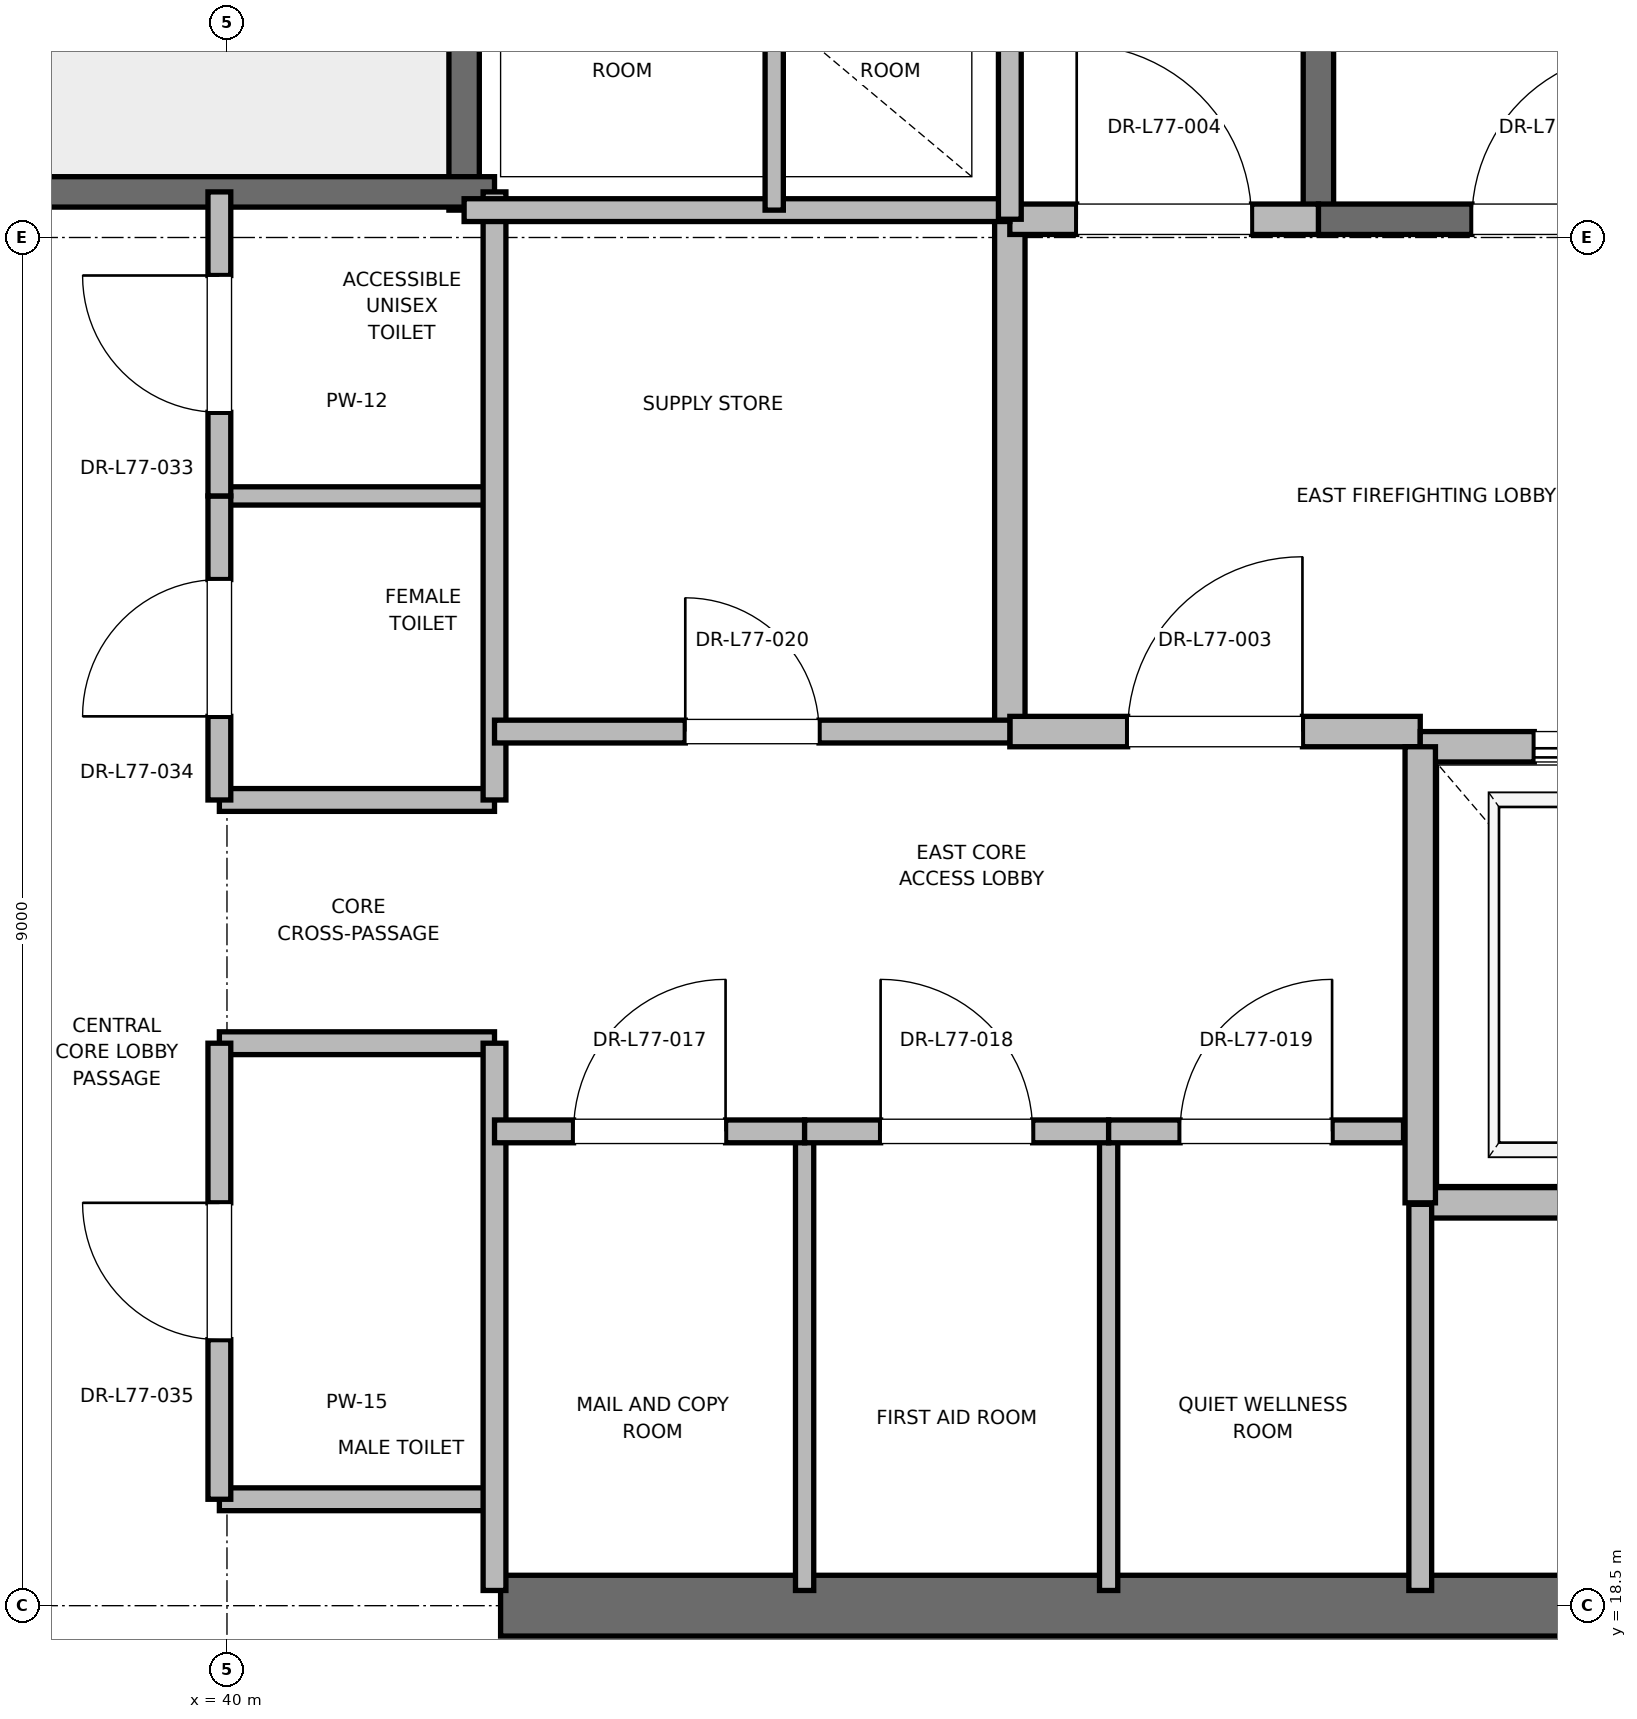
"""IFC4 building model, lengths in metres.
Left out: names, types, materials, properties, quantities, classifications, styles, units other than length and angle.
Written with IfcOpenShell. Run it as: python <this file> out.ifc"""

import sys

from ifc_helpers import new_model, si_unit, direction, frame, frame_2d, origin, place, context, subcontext, project, spatial, rectangle, extrude, element, fill, save


model = new_model("IFC4")
c1 = context("Model", 3, precision=1e-05, world=origin(), true_north=direction((0.0, 1.0)))
c2 = subcontext(c1, "Body", "Model", "MODEL_VIEW")
j1 = project(units=[si_unit("LENGTHUNIT", "METRE"), si_unit("PLANEANGLEUNIT", "RADIAN")], contexts=[c1])
p1 = place(None, origin())
s1 = spatial("IfcSite", under=j1, at=p1, CompositionType="ELEMENT")
p2 = place(p1, origin())
s2 = spatial("IfcBuilding", under=s1, at=p2, CompositionType="ELEMENT")
p3 = place(p2, frame((0.0, 0.0, 330.8)))
s3 = spatial("IfcBuildingStorey", under=s2, at=p3, CompositionType="ELEMENT", Elevation=330.8)
p4 = place(p3, frame((41.8, 18.5, 0.0), z_axis=(0.0, 0.0, 1.0), x_axis=(1.0, 0.0, 0.0)))
e1 = element("IfcWall", 1, at=p4, inside=s3, PredefinedType="SHEAR", context=c2, shape_type="SweptSolid", body=[
    extrude(rectangle(XDim=9.2, YDim=0.4, at=frame_2d((4.6, 0.0))), origin(), (0.0, 0.0, 1.0), 3.785),
])
p5 = place(p3, frame((47.18, 27.62, 0.0), z_axis=(0.0, 0.0, 1.0), x_axis=(0.0, 1.0, 0.0)))
e2 = element("IfcWall", 2, at=p5, inside=s3, PredefinedType="SOLIDWALL", context=c2, shape_type="SweptSolid", body=[
    extrude(rectangle(XDim=8.18, YDim=0.2, at=frame_2d((4.09, 0.0))), origin(), (0.0, 0.0, 1.0), 3.785),
])
p6 = place(p3, frame((47.18, 27.62, 0.0), z_axis=(0.0, 0.0, 1.0), x_axis=(1.0, 0.0, 0.0)))
e3 = element("IfcWall", 3, at=p6, inside=s3, PredefinedType="SOLIDWALL", context=c2, shape_type="SweptSolid", body=[
    extrude(rectangle(XDim=3.12, YDim=0.2, at=frame_2d((1.56, 0.0))), origin(), (0.0, 0.0, 1.0), 3.785),
])
p7 = place(p6, frame((1.01, 0.0, 0.0)))
e4 = element("IfcOpeningElement", 4, at=p7, cuts=e3, PredefinedType="OPENING", context=c2, shape_type="SweptSolid", body=[
    extrude(rectangle(XDim=1.1, YDim=2.15, at=frame_2d((0.55, 1.075))), frame((0.0, 0.1, 0.0), z_axis=(0.0, -1.0, 0.0), x_axis=(1.0, 0.0, 0.0)), (0.0, 0.0, 1.0), 0.2),
])
p8 = place(p3, frame((41.56, 27.68, 0.0), z_axis=(0.0, 0.0, 1.0), x_axis=(0.0, 1.0, 0.0)))
e5 = element("IfcWall", 5, at=p8, inside=s3, PredefinedType="SOLIDWALL", context=c2, shape_type="SweptSolid", body=[
    extrude(rectangle(XDim=8.57, YDim=0.2, at=frame_2d((4.285, 0.0))), origin(), (0.0, 0.0, 1.0), 3.785),
])
p9 = place(p3, frame((38.44, 27.8, 0.0), z_axis=(0.0, 0.0, 1.0), x_axis=(1.0, 0.0, 0.0)))
e6 = element("IfcWall", 6, at=p9, inside=s3, PredefinedType="SOLIDWALL", context=c2, shape_type="SweptSolid", body=[
    extrude(rectangle(XDim=3.32, YDim=0.2, at=frame_2d((1.66, 0.0))), origin(), (0.0, 0.0, 1.0), 3.785),
])
p10 = place(p3, frame((45.15, 24.25, 0.0), z_axis=(0.0, 0.0, 1.0), x_axis=(0.0, 1.0, 0.0)))
e7 = element("IfcWall", 7, at=p10, inside=s3, PredefinedType="PARTITIONING", context=c2, shape_type="SweptSolid", body=[
    extrude(rectangle(XDim=3.37, YDim=0.2, at=frame_2d((1.685, 0.0))), origin(), (0.0, 0.0, 1.0), 3.785),
])
p11 = place(p3, frame((45.15, 24.25, 0.0), z_axis=(0.0, 0.0, 1.0), x_axis=(1.0, 0.0, 0.0)))
e8 = element("IfcWall", 8, at=p11, inside=s3, PredefinedType="PARTITIONING", context=c2, shape_type="SweptSolid", body=[
    extrude(rectangle(XDim=2.7, YDim=0.2, at=frame_2d((1.35, 0.0))), origin(), (0.0, 0.0, 1.0), 3.785),
])
p12 = place(p11, frame((0.775, 0.0, 0.0)))
e9 = element("IfcOpeningElement", 9, at=p12, cuts=e8, PredefinedType="OPENING", context=c2, shape_type="SweptSolid", body=[
    extrude(rectangle(XDim=1.15, YDim=2.2, at=frame_2d((0.575, 1.1))), frame((0.0, 0.1, 0.0), z_axis=(0.0, -1.0, 0.0), x_axis=(1.0, 0.0, 0.0)), (0.0, 0.0, 1.0), 0.2),
])
p13 = place(p3, frame((45.15, 27.62, 0.0), z_axis=(0.0, 0.0, 1.0), x_axis=(1.0, 0.0, 0.0)))
e10 = element("IfcWall", 10, at=p13, inside=s3, PredefinedType="PARTITIONING", context=c2, shape_type="SweptSolid", body=[
    extrude(rectangle(XDim=2.03, YDim=0.2, at=frame_2d((1.015, 0.0))), origin(), (0.0, 0.0, 1.0), 3.785),
])
p14 = place(p13, frame((0.44, 0.0, 0.0)))
e11 = element("IfcOpeningElement", 11, at=p14, cuts=e10, PredefinedType="OPENING", context=c2, shape_type="SweptSolid", body=[
    extrude(rectangle(XDim=1.15, YDim=2.2, at=frame_2d((0.575, 1.1))), frame((0.0, 0.1, 0.0), z_axis=(0.0, -1.0, 0.0), x_axis=(1.0, 0.0, 0.0)), (0.0, 0.0, 1.0), 0.2),
])
p15 = place(p3, frame((47.85, 21.15, 0.0), z_axis=(0.0, 0.0, 1.0), x_axis=(1.0, 0.0, 0.0)))
e12 = element("IfcWall", 12, at=p15, inside=s3, PredefinedType="SOLIDWALL", context=c2, shape_type="SweptSolid", body=[
    extrude(rectangle(XDim=2.6, YDim=0.2, at=frame_2d((1.3, 0.0))), origin(), (0.0, 0.0, 1.0), 3.785),
])
p16 = place(p3, frame((50.45, 24.15, 0.0), z_axis=(0.0, 0.0, 1.0), x_axis=(-1.0, 0.0, 0.0)))
e13 = element("IfcWall", 13, at=p16, inside=s3, PredefinedType="SOLIDWALL", context=c2, shape_type="SweptSolid", body=[
    extrude(rectangle(XDim=2.6, YDim=0.2, at=frame_2d((1.3, 0.0))), origin(), (0.0, 0.0, 1.0), 2.865),
])
p17 = place(p16, frame((0.75, 0.0, 0.0)))
e14 = element("IfcOpeningElement", 14, at=p17, cuts=e13, PredefinedType="OPENING", context=c2, shape_type="SweptSolid", body=[
    extrude(rectangle(XDim=1.1, YDim=2.2, at=frame_2d((0.55, 1.1))), frame((0.0, 0.1, 0.0), z_axis=(0.0, -1.0, 0.0), x_axis=(1.0, 0.0, 0.0)), (0.0, 0.0, 1.0), 0.2),
])
p18 = place(p3, frame((47.85, 24.15, 0.0), z_axis=(0.0, 0.0, 1.0), x_axis=(0.0, -1.0, 0.0)))
e15 = element("IfcWall", 15, at=p18, inside=s3, PredefinedType="SOLIDWALL", context=c2, shape_type="SweptSolid", body=[
    extrude(rectangle(XDim=3.0, YDim=0.2, at=frame_2d((1.5, 0.0))), origin(), (0.0, 0.0, 1.0), 3.785),
])
for number, where, z_axis, x_axis in (
    (16, (39.95, 19.2, 0.0), (0.0, 0.0, 1.0), (1.0, 0.0, 0.0)),
    (17, (39.95, 22.2, 0.0), (0.0, 0.0, 1.0), (1.0, 0.0, 0.0)),
    (18, (39.95, 23.8, 0.0), (0.0, 0.0, 1.0), (1.0, 0.0, 0.0)),
):
    element("IfcWall", number, at=place(p3, frame(where, z_axis=z_axis, x_axis=x_axis)), inside=s3, PredefinedType="PARTITIONING", context=c2, shape_type="SweptSolid", body=[
        extrude(rectangle(XDim=1.81, YDim=0.15, at=frame_2d((0.905, 0.0))), origin(), (0.0, 0.0, 1.0), 2.85),
    ])
p19 = place(p3, frame((39.95, 25.8, 0.0), z_axis=(0.0, 0.0, 1.0), x_axis=(1.0, 0.0, 0.0)))
e19 = element("IfcWall", 19, at=p19, inside=s3, PredefinedType="PARTITIONING", context=c2, shape_type="SweptSolid", body=[
    extrude(rectangle(XDim=1.81, YDim=0.12, at=frame_2d((0.905, 0.0))), origin(), (0.0, 0.0, 1.0), 2.85),
])
p20 = place(p3, frame((41.76, 18.6, 0.0), z_axis=(0.0, 0.0, 1.0), x_axis=(0.0, 1.0, 0.0)))
e20 = element("IfcWall", 20, at=p20, inside=s3, PredefinedType="PARTITIONING", context=c2, shape_type="SweptSolid", body=[
    extrude(rectangle(XDim=3.6, YDim=0.15, at=frame_2d((1.8, 0.0))), origin(), (0.0, 0.0, 1.0), 2.85),
])
p21 = place(p3, frame((41.76, 23.8, 0.0), z_axis=(0.0, 0.0, 1.0), x_axis=(0.0, 1.0, 0.0)))
e21 = element("IfcWall", 21, at=p21, inside=s3, PredefinedType="PARTITIONING", context=c2, shape_type="SweptSolid", body=[
    extrude(rectangle(XDim=4.0, YDim=0.15, at=frame_2d((2.0, 0.0))), origin(), (0.0, 0.0, 1.0), 2.85),
])
p22 = place(p3, frame((39.95, 19.2, 0.0), z_axis=(0.0, 0.0, 1.0), x_axis=(0.0, 1.0, 0.0)))
e22 = element("IfcWall", 22, at=p22, inside=s3, PredefinedType="PARTITIONING", context=c2, shape_type="SweptSolid", body=[
    extrude(rectangle(XDim=3.0, YDim=0.15, at=frame_2d((1.5, 0.0))), origin(), (0.0, 0.0, 1.0), 2.85),
])
p23 = place(p22, frame((1.05, 0.0, 0.0)))
e23 = element("IfcOpeningElement", 23, at=p23, cuts=e22, PredefinedType="OPENING", context=c2, shape_type="SweptSolid", body=[
    extrude(rectangle(XDim=0.9, YDim=2.1, at=frame_2d((0.45, 1.05))), frame((0.0, 0.075, 0.0), z_axis=(0.0, -1.0, 0.0), x_axis=(1.0, 0.0, 0.0)), (0.0, 0.0, 1.0), 0.15),
])
p24 = place(p3, frame((39.95, 23.8, 0.0), z_axis=(0.0, 0.0, 1.0), x_axis=(0.0, 1.0, 0.0)))
e24 = element("IfcWall", 24, at=p24, inside=s3, PredefinedType="PARTITIONING", context=c2, shape_type="SweptSolid", body=[
    extrude(rectangle(XDim=2.0, YDim=0.15, at=frame_2d((1.0, 0.0))), origin(), (0.0, 0.0, 1.0), 2.85),
])
p25 = place(p24, frame((0.55, 0.0, 0.0)))
e25 = element("IfcOpeningElement", 25, at=p25, cuts=e24, PredefinedType="OPENING", context=c2, shape_type="SweptSolid", body=[
    extrude(rectangle(XDim=0.9, YDim=2.1, at=frame_2d((0.45, 1.05))), frame((0.0, 0.075, 0.0), z_axis=(0.0, -1.0, 0.0), x_axis=(1.0, 0.0, 0.0)), (0.0, 0.0, 1.0), 0.15),
])
p26 = place(p3, frame((39.95, 25.8, 0.0), z_axis=(0.0, 0.0, 1.0), x_axis=(0.0, 1.0, 0.0)))
e26 = element("IfcWall", 26, at=p26, inside=s3, PredefinedType="PARTITIONING", context=c2, shape_type="SweptSolid", body=[
    extrude(rectangle(XDim=2.0, YDim=0.15, at=frame_2d((1.0, 0.0))), origin(), (0.0, 0.0, 1.0), 2.85),
])
p27 = place(p26, frame((0.55, 0.0, 0.0)))
e27 = element("IfcOpeningElement", 27, at=p27, cuts=e26, PredefinedType="OPENING", context=c2, shape_type="SweptSolid", body=[
    extrude(rectangle(XDim=0.9, YDim=2.1, at=frame_2d((0.45, 1.05))), frame((0.0, 0.075, 0.0), z_axis=(0.0, -1.0, 0.0), x_axis=(1.0, 0.0, 0.0)), (0.0, 0.0, 1.0), 0.15),
])
p28 = place(p3, frame((41.56, 27.68, 0.0), z_axis=(0.0, 0.0, 1.0), x_axis=(1.0, 0.0, 0.0)))
e28 = element("IfcWall", 28, at=p28, inside=s3, PredefinedType="PARTITIONING", context=c2, shape_type="SweptSolid", body=[
    extrude(rectangle(XDim=3.59, YDim=0.15, at=frame_2d((1.795, 0.0))), origin(), (0.0, 0.0, 1.0), 2.85),
])
p29 = place(p3, frame((47.85, 18.6, 0.0), z_axis=(0.0, 0.0, 1.0), x_axis=(0.0, 1.0, 0.0)))
e29 = element("IfcWall", 29, at=p29, inside=s3, PredefinedType="PARTITIONING", context=c2, shape_type="SweptSolid", body=[
    extrude(rectangle(XDim=2.54, YDim=0.15, at=frame_2d((1.27, 0.0))), origin(), (0.0, 0.0, 1.0), 2.85),
])
for number, where, z_axis, x_axis in (
    (30, (43.8, 18.6, 0.0), (0.0, 0.0, 1.0), (0.0, 1.0, 0.0)),
    (31, (45.8, 18.6, 0.0), (0.0, 0.0, 1.0), (0.0, 1.0, 0.0)),
):
    element("IfcWall", number, at=place(p3, frame(where, z_axis=z_axis, x_axis=x_axis)), inside=s3, PredefinedType="PARTITIONING", context=c2, shape_type="SweptSolid", body=[
        extrude(rectangle(XDim=3.02, YDim=0.12, at=frame_2d((1.51, 0.0))), origin(), (0.0, 0.0, 1.0), 2.85),
    ])
p30 = place(p3, frame((41.76, 21.62, 0.0), z_axis=(0.0, 0.0, 1.0), x_axis=(1.0, 0.0, 0.0)))
e32 = element("IfcWall", 32, at=p30, inside=s3, PredefinedType="PARTITIONING", context=c2, shape_type="SweptSolid", body=[
    extrude(rectangle(XDim=2.04, YDim=0.15, at=frame_2d((1.02, 0.0))), origin(), (0.0, 0.0, 1.0), 2.85),
])
p31 = place(p30, frame((0.52, 0.0, 0.0)))
e33 = element("IfcOpeningElement", 33, at=p31, cuts=e32, PredefinedType="OPENING", context=c2, shape_type="SweptSolid", body=[
    extrude(rectangle(XDim=1.0, YDim=2.15, at=frame_2d((0.5, 1.075))), frame((0.0, 0.075, 0.0), z_axis=(0.0, -1.0, 0.0), x_axis=(1.0, 0.0, 0.0)), (0.0, 0.0, 1.0), 0.15),
])
p32 = place(p3, frame((43.8, 21.62, 0.0), z_axis=(0.0, 0.0, 1.0), x_axis=(1.0, 0.0, 0.0)))
e34 = element("IfcWall", 34, at=p32, inside=s3, PredefinedType="PARTITIONING", context=c2, shape_type="SweptSolid", body=[
    extrude(rectangle(XDim=2.0, YDim=0.15, at=frame_2d((1.0, 0.0))), origin(), (0.0, 0.0, 1.0), 2.85),
])
p33 = place(p32, frame((0.5, 0.0, 0.0)))
e35 = element("IfcOpeningElement", 35, at=p33, cuts=e34, PredefinedType="OPENING", context=c2, shape_type="SweptSolid", body=[
    extrude(rectangle(XDim=1.0, YDim=2.15, at=frame_2d((0.5, 1.075))), frame((0.0, 0.075, 0.0), z_axis=(0.0, -1.0, 0.0), x_axis=(1.0, 0.0, 0.0)), (0.0, 0.0, 1.0), 0.15),
])
p34 = place(p3, frame((45.8, 21.62, 0.0), z_axis=(0.0, 0.0, 1.0), x_axis=(1.0, 0.0, 0.0)))
e36 = element("IfcWall", 36, at=p34, inside=s3, PredefinedType="PARTITIONING", context=c2, shape_type="SweptSolid", body=[
    extrude(rectangle(XDim=1.94, YDim=0.15, at=frame_2d((0.97, 0.0))), origin(), (0.0, 0.0, 1.0), 2.85),
])
p35 = place(p34, frame((0.47, 0.0, 0.0)))
e37 = element("IfcOpeningElement", 37, at=p35, cuts=e36, PredefinedType="OPENING", context=c2, shape_type="SweptSolid", body=[
    extrude(rectangle(XDim=1.0, YDim=2.15, at=frame_2d((0.5, 1.075))), frame((0.0, 0.075, 0.0), z_axis=(0.0, -1.0, 0.0), x_axis=(1.0, 0.0, 0.0)), (0.0, 0.0, 1.0), 0.15),
])
p36 = place(p3, frame((41.76, 24.25, 0.0), z_axis=(0.0, 0.0, 1.0), x_axis=(1.0, 0.0, 0.0)))
e38 = element("IfcWall", 38, at=p36, inside=s3, PredefinedType="PARTITIONING", context=c2, shape_type="SweptSolid", body=[
    extrude(rectangle(XDim=3.39, YDim=0.15, at=frame_2d((1.695, 0.0))), origin(), (0.0, 0.0, 1.0), 2.85),
])
p37 = place(p36, frame((1.255, 0.0, 0.0)))
e39 = element("IfcOpeningElement", 39, at=p37, cuts=e38, PredefinedType="OPENING", context=c2, shape_type="SweptSolid", body=[
    extrude(rectangle(XDim=0.88, YDim=2.1, at=frame_2d((0.44, 1.05))), frame((0.0, 0.075, 0.0), z_axis=(0.0, -1.0, 0.0), x_axis=(1.0, 0.0, 0.0)), (0.0, 0.0, 1.0), 0.15),
])
p38 = place(p3, frame((45.15, 27.62, 0.0), z_axis=(0.0, 0.0, 1.0), x_axis=(0.0, 1.0, 0.0)))
e40 = element("IfcWall", 40, at=p38, inside=s3, PredefinedType="PARTITIONING", context=c2, shape_type="SweptSolid", body=[
    extrude(rectangle(XDim=3.1, YDim=0.15, at=frame_2d((1.55, 0.0))), origin(), (0.0, 0.0, 1.0), 2.85),
])
p39 = place(p3, frame((43.6, 27.68, 0.0), z_axis=(0.0, 0.0, 1.0), x_axis=(0.0, 1.0, 0.0)))
e41 = element("IfcWall", 41, at=p39, inside=s3, PredefinedType="PARTITIONING", context=c2, shape_type="SweptSolid", body=[
    extrude(rectangle(XDim=3.04, YDim=0.12, at=frame_2d((1.52, 0.0))), origin(), (0.0, 0.0, 1.0), 2.85),
])
p40 = place(p7, origin())
e42 = element("IfcDoor", 42, at=p40, inside=s3, OperationType="SINGLE_SWING_RIGHT", PredefinedType="DOOR", context=c2, shape_type="SweptSolid", body=[
    extrude(rectangle(XDim=1.1, YDim=2.15, at=frame_2d((0.55, 1.075))), frame((0.0, 0.025, 0.0), z_axis=(0.0, -1.0, 0.0), x_axis=(1.0, 0.0, 0.0)), (0.0, 0.0, 1.0), 0.05),
])
fill(e4, e42)
p41 = place(p12, origin())
e43 = element("IfcDoor", 43, at=p41, inside=s3, OperationType="SINGLE_SWING_RIGHT", PredefinedType="DOOR", context=c2, shape_type="SweptSolid", body=[
    extrude(rectangle(XDim=1.15, YDim=2.2, at=frame_2d((0.575, 1.1))), frame((0.0, 0.025, 0.0), z_axis=(0.0, -1.0, 0.0), x_axis=(1.0, 0.0, 0.0)), (0.0, 0.0, 1.0), 0.05),
])
fill(e9, e43)
p42 = place(p14, origin())
e44 = element("IfcDoor", 44, at=p42, inside=s3, OperationType="SINGLE_SWING_LEFT", PredefinedType="DOOR", context=c2, shape_type="SweptSolid", body=[
    extrude(rectangle(XDim=1.15, YDim=2.2, at=frame_2d((0.575, 1.1))), frame((0.0, 0.025, 0.0), z_axis=(0.0, -1.0, 0.0), x_axis=(1.0, 0.0, 0.0)), (0.0, 0.0, 1.0), 0.05),
])
fill(e11, e44)
p43 = place(p17, origin())
e45 = element("IfcDoor", 45, at=p43, inside=s3, OperationType="SLIDING_TO_RIGHT", PredefinedType="DOOR", context=c2, shape_type="SweptSolid", body=[
    extrude(rectangle(XDim=1.1, YDim=2.2, at=frame_2d((0.55, 1.1))), frame((0.0, 0.025, 0.0), z_axis=(0.0, -1.0, 0.0), x_axis=(1.0, 0.0, 0.0)), (0.0, 0.0, 1.0), 0.05),
])
fill(e14, e45)
p44 = place(p23, origin())
e46 = element("IfcDoor", 46, at=p44, inside=s3, OperationType="SINGLE_SWING_RIGHT", PredefinedType="DOOR", context=c2, shape_type="SweptSolid", body=[
    extrude(rectangle(XDim=0.9, YDim=2.1, at=frame_2d((0.45, 1.05))), frame((0.0, 0.025, 0.0), z_axis=(0.0, -1.0, 0.0), x_axis=(1.0, 0.0, 0.0)), (0.0, 0.0, 1.0), 0.05),
])
fill(e23, e46)
p45 = place(p25, origin())
e47 = element("IfcDoor", 47, at=p45, inside=s3, OperationType="SINGLE_SWING_LEFT", PredefinedType="DOOR", context=c2, shape_type="SweptSolid", body=[
    extrude(rectangle(XDim=0.9, YDim=2.1, at=frame_2d((0.45, 1.05))), frame((0.0, 0.025, 0.0), z_axis=(0.0, -1.0, 0.0), x_axis=(1.0, 0.0, 0.0)), (0.0, 0.0, 1.0), 0.05),
])
fill(e25, e47)
p46 = place(p27, origin())
e48 = element("IfcDoor", 48, at=p46, inside=s3, OperationType="SINGLE_SWING_RIGHT", PredefinedType="DOOR", context=c2, shape_type="SweptSolid", body=[
    extrude(rectangle(XDim=0.9, YDim=2.1, at=frame_2d((0.45, 1.05))), frame((0.0, 0.025, 0.0), z_axis=(0.0, -1.0, 0.0), x_axis=(1.0, 0.0, 0.0)), (0.0, 0.0, 1.0), 0.05),
])
fill(e27, e48)
p47 = place(p31, origin())
e49 = element("IfcDoor", 49, at=p47, inside=s3, OperationType="SINGLE_SWING_RIGHT", PredefinedType="DOOR", context=c2, shape_type="SweptSolid", body=[
    extrude(rectangle(XDim=1.0, YDim=2.15, at=frame_2d((0.5, 1.075))), frame((0.0, 0.025, 0.0), z_axis=(0.0, -1.0, 0.0), x_axis=(1.0, 0.0, 0.0)), (0.0, 0.0, 1.0), 0.05),
])
fill(e33, e49)
p48 = place(p33, origin())
e50 = element("IfcDoor", 50, at=p48, inside=s3, OperationType="SINGLE_SWING_LEFT", PredefinedType="DOOR", context=c2, shape_type="SweptSolid", body=[
    extrude(rectangle(XDim=1.0, YDim=2.15, at=frame_2d((0.5, 1.075))), frame((0.0, 0.025, 0.0), z_axis=(0.0, -1.0, 0.0), x_axis=(1.0, 0.0, 0.0)), (0.0, 0.0, 1.0), 0.05),
])
fill(e35, e50)
p49 = place(p35, origin())
e51 = element("IfcDoor", 51, at=p49, inside=s3, OperationType="SINGLE_SWING_RIGHT", PredefinedType="DOOR", context=c2, shape_type="SweptSolid", body=[
    extrude(rectangle(XDim=1.0, YDim=2.15, at=frame_2d((0.5, 1.075))), frame((0.0, 0.025, 0.0), z_axis=(0.0, -1.0, 0.0), x_axis=(1.0, 0.0, 0.0)), (0.0, 0.0, 1.0), 0.05),
])
fill(e37, e51)
p50 = place(p37, origin())
e52 = element("IfcDoor", 52, at=p50, inside=s3, OperationType="SINGLE_SWING_LEFT", PredefinedType="DOOR", context=c2, shape_type="SweptSolid", body=[
    extrude(rectangle(XDim=0.88, YDim=2.1, at=frame_2d((0.44, 1.05))), frame((0.0, 0.025, 0.0), z_axis=(0.0, -1.0, 0.0), x_axis=(1.0, 0.0, 0.0)), (0.0, 0.0, 1.0), 0.05),
])
fill(e39, e52)
save(model, sys.argv[1])
